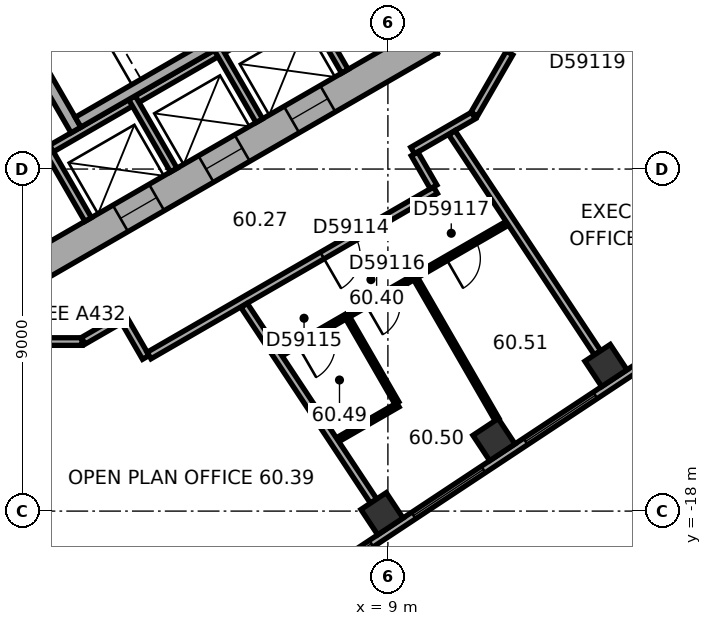
"""IFC4 building model, lengths in metres.
Left out: names, types, materials, properties, quantities, classifications, styles, units other than length and angle.
Written with IfcOpenShell. Run it as: python <this file> out.ifc"""

import sys

from ifc_helpers import new_model, si_unit, direction, frame, frame_2d, origin, origin_2d, place, context, subcontext, project, spatial, rectangle, extrude, element, fill, save


model = new_model("IFC4")
c1 = context("Model", 3, precision=1e-05, world=origin(), true_north=direction((0.0, 1.0)))
c2 = subcontext(c1, "Body", "Model", "MODEL_VIEW")
j1 = project(units=[si_unit("LENGTHUNIT", "METRE"), si_unit("PLANEANGLEUNIT", "RADIAN")], contexts=[c1])
p1 = place(None, origin())
s1 = spatial("IfcSite", under=j1, at=p1, CompositionType="ELEMENT")
p2 = place(p1, origin())
s2 = spatial("IfcBuilding", under=s1, at=p2, CompositionType="ELEMENT")
p3 = place(p2, frame((0.0, 0.0, 243.9)))
s3 = spatial("IfcBuildingStorey", under=s2, at=p3, CompositionType="ELEMENT", Elevation=243.9)
for number, where, z_axis, x_axis in (
    (1, (8.844, -18.07, 0.0), (0.0, 0.0, 1.0), (0.834, 0.552, 0.0)),
    (2, (11.791, -16.12, 0.0), (0.0, 0.0, 1.0), (0.834, 0.552, 0.0)),
    (3, (14.738, -14.169, 0.0), (0.0, 0.0, 1.0), (0.834, 0.552, 0.0)),
):
    element("IfcColumn", number, at=place(p3, frame(where, z_axis=z_axis, x_axis=x_axis)), inside=s3, PredefinedType="COLUMN", context=c2, shape_type="SweptSolid", body=[
        extrude(rectangle(XDim=0.8, YDim=0.8, at=origin_2d()), origin(), (0.0, 0.0, 1.0), 3.7),
    ])
p4 = place(p3, frame((9.9, -5.947, 0.0), z_axis=(0.0, 0.0, 1.0), x_axis=(0.0, 1.0, 0.0)))
e4 = element("IfcWall", 4, at=p4, inside=s3, PredefinedType="SHEAR", context=c2, shape_type="SweptSolid", body=[
    extrude(rectangle(XDim=11.894, YDim=0.8, at=frame_2d((5.947, 0.0))), origin(), (0.0, 0.0, 1.0), 3.7),
])
p5 = place(p4, frame((6.147, 0.0, 0.0)))
e5 = element("IfcOpeningElement", 5, at=p5, cuts=e4, PredefinedType="OPENING", context=c2, shape_type="SweptSolid", body=[
    extrude(rectangle(XDim=1.5, YDim=2.1, at=frame_2d((0.75, 1.05))), frame((0.0, 0.41, 0.0), z_axis=(0.0, -1.0, 0.0), x_axis=(1.0, 0.0, 0.0)), (0.0, 0.0, 1.0), 0.82),
])
p6 = place(p4, frame((1.697, 0.0, 0.0)))
e6 = element("IfcOpeningElement", 6, at=p6, cuts=e4, PredefinedType="OPENING", context=c2, shape_type="SweptSolid", body=[
    extrude(rectangle(XDim=0.9, YDim=2.1, at=frame_2d((0.45, 1.05))), frame((0.0, 0.41, 0.0), z_axis=(0.0, -1.0, 0.0), x_axis=(1.0, 0.0, 0.0)), (0.0, 0.0, 1.0), 0.82),
])
p7 = place(p4, frame((4.297, 0.0, 0.0)))
e7 = element("IfcOpeningElement", 7, at=p7, cuts=e4, PredefinedType="OPENING", context=c2, shape_type="SweptSolid", body=[
    extrude(rectangle(XDim=0.9, YDim=2.1, at=frame_2d((0.45, 1.05))), frame((0.0, 0.41, 0.0), z_axis=(0.0, -1.0, 0.0), x_axis=(1.0, 0.0, 0.0)), (0.0, 0.0, 1.0), 0.82),
])
p8 = place(p3, frame((-10.1, -5.6, 0.0), z_axis=(0.0, 0.0, 1.0), x_axis=(0.866023897231, -0.500002609418, 0.0)))
e8 = element("IfcWall", 8, at=p8, inside=s3, PredefinedType="SHEAR", context=c2, shape_type="SweptSolid", body=[
    extrude(rectangle(XDim=11.894, YDim=0.8, at=frame_2d((5.947, 0.0))), origin(), (0.0, 0.0, 1.0), 3.7),
])
p9 = place(p8, frame((6.147, 0.0, 0.0)))
e9 = element("IfcOpeningElement", 9, at=p9, cuts=e8, PredefinedType="OPENING", context=c2, shape_type="SweptSolid", body=[
    extrude(rectangle(XDim=1.5, YDim=2.1, at=frame_2d((0.75, 1.05))), frame((0.0, 0.41, 0.0), z_axis=(0.0, -1.0, 0.0), x_axis=(1.0, 0.0, 0.0)), (0.0, 0.0, 1.0), 0.82),
])
p10 = place(p8, frame((1.597, 0.0, 0.0)))
e10 = element("IfcOpeningElement", 10, at=p10, cuts=e8, PredefinedType="OPENING", context=c2, shape_type="SweptSolid", body=[
    extrude(rectangle(XDim=1.1, YDim=2.1, at=frame_2d((0.55, 1.05))), frame((0.0, 0.41, 0.0), z_axis=(0.0, -1.0, 0.0), x_axis=(1.0, 0.0, 0.0)), (0.0, 0.0, 1.0), 0.82),
])
p11 = place(p8, frame((4.197, 0.0, 0.0)))
e11 = element("IfcOpeningElement", 11, at=p11, cuts=e8, PredefinedType="OPENING", context=c2, shape_type="SweptSolid", body=[
    extrude(rectangle(XDim=1.1, YDim=2.1, at=frame_2d((0.55, 1.05))), frame((0.0, 0.41, 0.0), z_axis=(0.0, -1.0, 0.0), x_axis=(1.0, 0.0, 0.0)), (0.0, 0.0, 1.0), 0.82),
])
p12 = place(p3, frame((-0.2, -11.547, 0.0), z_axis=(0.0, 0.0, 1.0), x_axis=(0.866023897231, 0.500002609418, 0.0)))
e12 = element("IfcWall", 12, at=p12, inside=s3, PredefinedType="SHEAR", context=c2, shape_type="SweptSolid", body=[
    extrude(rectangle(XDim=11.894, YDim=0.8, at=frame_2d((5.947, 0.0))), origin(), (0.0, 0.0, 1.0), 3.7),
])
p13 = place(p12, frame((2.497, 0.0, 0.0)))
e13 = element("IfcOpeningElement", 13, at=p13, cuts=e12, PredefinedType="OPENING", context=c2, shape_type="SweptSolid", body=[
    extrude(rectangle(XDim=1.1, YDim=2.1, at=frame_2d((0.55, 1.05))), frame((0.0, 0.41, 0.0), z_axis=(0.0, -1.0, 0.0), x_axis=(1.0, 0.0, 0.0)), (0.0, 0.0, 1.0), 0.82),
])
p14 = place(p12, frame((5.097, 0.0, 0.0)))
e14 = element("IfcOpeningElement", 14, at=p14, cuts=e12, PredefinedType="OPENING", context=c2, shape_type="SweptSolid", body=[
    extrude(rectangle(XDim=1.1, YDim=2.1, at=frame_2d((0.55, 1.05))), frame((0.0, 0.41, 0.0), z_axis=(0.0, -1.0, 0.0), x_axis=(1.0, 0.0, 0.0)), (0.0, 0.0, 1.0), 0.82),
])
p15 = place(p12, frame((7.697, 0.0, 0.0)))
e15 = element("IfcOpeningElement", 15, at=p15, cuts=e12, PredefinedType="OPENING", context=c2, shape_type="SweptSolid", body=[
    extrude(rectangle(XDim=1.1, YDim=2.1, at=frame_2d((0.55, 1.05))), frame((0.0, 0.41, 0.0), z_axis=(0.0, -1.0, 0.0), x_axis=(1.0, 0.0, 0.0)), (0.0, 0.0, 1.0), 0.82),
])
p16 = place(p3, frame((2.739, -22.711, 0.0), z_axis=(0.0, 0.0, 1.0), x_axis=(0.833885723098, 0.551937134838, 0.0)))
e16 = element("IfcWall", 16, at=p16, inside=s3, PredefinedType="STANDARD", context=c2, shape_type="SweptSolid", body=[
    extrude(rectangle(XDim=18.841, YDim=0.2, at=frame_2d((9.421, 0.0))), origin(), (0.0, 0.0, 1.0), 3.7),
])
p17 = place(p16, frame((1.252, 0.0, 0.9)))
e17 = element("IfcOpeningElement", 17, at=p17, cuts=e16, PredefinedType="OPENING", context=c2, shape_type="SweptSolid", body=[
    extrude(rectangle(XDim=2.2, YDim=2.0, at=frame_2d((1.1, 1.0))), frame((0.0, 0.11, 0.0), z_axis=(0.0, -1.0, 0.0), x_axis=(1.0, 0.0, 0.0)), (0.0, 0.0, 1.0), 0.22),
])
p18 = place(p16, frame((4.786, 0.0, 0.9)))
e18 = element("IfcOpeningElement", 18, at=p18, cuts=e16, PredefinedType="OPENING", context=c2, shape_type="SweptSolid", body=[
    extrude(rectangle(XDim=2.2, YDim=2.0, at=frame_2d((1.1, 1.0))), frame((0.0, 0.11, 0.0), z_axis=(0.0, -1.0, 0.0), x_axis=(1.0, 0.0, 0.0)), (0.0, 0.0, 1.0), 0.22),
])
p19 = place(p16, frame((8.32, 0.0, 0.9)))
e19 = element("IfcOpeningElement", 19, at=p19, cuts=e16, PredefinedType="OPENING", context=c2, shape_type="SweptSolid", body=[
    extrude(rectangle(XDim=2.2, YDim=2.0, at=frame_2d((1.1, 1.0))), frame((0.0, 0.11, 0.0), z_axis=(0.0, -1.0, 0.0), x_axis=(1.0, 0.0, 0.0)), (0.0, 0.0, 1.0), 0.22),
])
p20 = place(p16, frame((11.854, 0.0, 0.9)))
e20 = element("IfcOpeningElement", 20, at=p20, cuts=e16, PredefinedType="OPENING", context=c2, shape_type="SweptSolid", body=[
    extrude(rectangle(XDim=2.2, YDim=2.0, at=frame_2d((1.1, 1.0))), frame((0.0, 0.11, 0.0), z_axis=(0.0, -1.0, 0.0), x_axis=(1.0, 0.0, 0.0)), (0.0, 0.0, 1.0), 0.22),
])
p21 = place(p16, frame((15.387, 0.0, 0.9)))
e21 = element("IfcOpeningElement", 21, at=p21, cuts=e16, PredefinedType="OPENING", context=c2, shape_type="SweptSolid", body=[
    extrude(rectangle(XDim=2.2, YDim=2.0, at=frame_2d((1.1, 1.0))), frame((0.0, 0.11, 0.0), z_axis=(0.0, -1.0, 0.0), x_axis=(1.0, 0.0, 0.0)), (0.0, 0.0, 1.0), 0.22),
])
p22 = place(p3, frame((-0.024, -8.559, 0.0), z_axis=(0.0, 0.0, 1.0), x_axis=(0.866026010844, 0.49999894854, 0.0)))
e22 = element("IfcWall", 22, at=p22, inside=s3, PredefinedType="PARTITIONING", context=c2, shape_type="SweptSolid", body=[
    extrude(rectangle(XDim=8.0, YDim=0.2, at=frame_2d((4.0, 0.0))), origin(), (0.0, 0.0, 1.0), 3.42),
])
for number, where, z_axis, x_axis in (
    (23, (0.013, -8.422, 0.0), (0.0, 0.0, 1.0), (0.5, -0.866, 0.0)),
    (24, (2.264, -7.122, 0.0), (0.0, 0.0, 1.0), (0.5, -0.866, 0.0)),
    (25, (4.516, -5.822, 0.0), (0.0, 0.0, 1.0), (0.5, -0.866, 0.0)),
    (26, (6.768, -4.522, 0.0), (0.0, 0.0, 1.0), (0.5, -0.866, 0.0)),
):
    element("IfcWall", number, at=place(p3, frame(where, z_axis=z_axis, x_axis=x_axis)), inside=s3, PredefinedType="PARTITIONING", context=c2, shape_type="SweptSolid", body=[
        extrude(rectangle(XDim=2.2, YDim=0.2, at=frame_2d((1.1, 0.0))), origin(), (0.0, 0.0, 1.0), 3.42),
    ])
p23 = place(p3, frame((-1.558, -3.902, 0.0), z_axis=(0.0, 0.0, 1.0), x_axis=(0.499977259774, -0.866038532462, 0.0)))
e27 = element("IfcWall", 27, at=p23, inside=s3, PredefinedType="SHEAR", context=c2, shape_type="SweptSolid", body=[
    extrude(rectangle(XDim=4.7, YDim=0.3, at=frame_2d((2.35, 0.0))), origin(), (0.0, 0.0, 1.0), 3.42),
])
p24 = place(p23, frame((0.8, 0.0, 0.0)))
e28 = element("IfcOpeningElement", 28, at=p24, cuts=e27, PredefinedType="OPENING", context=c2, shape_type="SweptSolid", body=[
    extrude(rectangle(XDim=1.2, YDim=2.1, at=frame_2d((0.6, 1.05))), frame((0.0, 0.16, 0.0), z_axis=(0.0, -1.0, 0.0), x_axis=(1.0, 0.0, 0.0)), (0.0, 0.0, 1.0), 0.32),
])
p25 = place(p3, frame((0.847, -7.767, 0.0), z_axis=(0.0, 0.0, 1.0), x_axis=(0.866027801685, 0.499995846692, 0.0)))
e29 = element("IfcWall", 29, at=p25, inside=s3, PredefinedType="SHEAR", context=c2, shape_type="SweptSolid", body=[
    extrude(rectangle(XDim=7.06, YDim=0.3, at=frame_2d((3.53, 0.0))), origin(), (0.0, 0.0, 1.0), 3.42),
])
p26 = place(p3, frame((-0.91, -13.539, 0.0), z_axis=(0.0, 0.0, 1.0), x_axis=(1.0, 0.0, 0.0)))
e30 = element("IfcWall", 30, at=p26, inside=s3, PredefinedType="PARTITIONING", context=c2, shape_type="SweptSolid", body=[
    extrude(rectangle(XDim=1.86, YDim=0.2, at=frame_2d((0.93, 0.0))), origin(), (0.0, 0.0, 1.0), 3.42),
])
p27 = place(p3, frame((0.985, -13.519, 0.0), z_axis=(0.0, 0.0, 1.0), x_axis=(0.866054082991, 0.499950322867, 0.0)))
e31 = element("IfcWall", 31, at=p27, inside=s3, PredefinedType="PARTITIONING", context=c2, shape_type="SweptSolid", body=[
    extrude(rectangle(XDim=1.206, YDim=0.2, at=frame_2d((0.603, 0.0))), origin(), (0.0, 0.0, 1.0), 3.42),
])
p28 = place(p3, frame((2.079, -13.003, 0.0), z_axis=(0.0, 0.0, 1.0), x_axis=(0.500074377092, -0.865982457891, 0.0)))
e32 = element("IfcWall", 32, at=p28, inside=s3, PredefinedType="PARTITIONING", context=c2, shape_type="SweptSolid", body=[
    extrude(rectangle(XDim=1.101, YDim=0.2, at=frame_2d((0.55, 0.0))), origin(), (0.0, 0.0, 1.0), 3.42),
])
p29 = place(p3, frame((2.716, -13.906, 0.0), z_axis=(0.0, 0.0, 1.0), x_axis=(0.866040290674, 0.499974214264, 0.0)))
e33 = element("IfcWall", 33, at=p29, inside=s3, PredefinedType="PARTITIONING", context=c2, shape_type="SweptSolid", body=[
    extrude(rectangle(XDim=8.702, YDim=0.2, at=frame_2d((4.351, 0.0))), origin(), (0.0, 0.0, 1.0), 3.42),
])
p30 = place(p29, frame((5.26, 0.0, 0.0)))
e34 = element("IfcOpeningElement", 34, at=p30, cuts=e33, PredefinedType="OPENING", context=c2, shape_type="SweptSolid", body=[
    extrude(rectangle(XDim=1.0, YDim=2.1, at=frame_2d((0.5, 1.05))), frame((0.0, 0.11, 0.0), z_axis=(0.0, -1.0, 0.0), x_axis=(1.0, 0.0, 0.0)), (0.0, 0.0, 1.0), 0.22),
])
p31 = place(p3, frame((6.183, -13.867, 0.0), z_axis=(0.0, 0.0, 1.0), x_axis=(0.866031365477, 0.499989673903, 0.0)))
e35 = element("IfcWall", 35, at=p31, inside=s3, PredefinedType="PARTITIONING", context=c2, shape_type="SweptSolid", body=[
    extrude(rectangle(XDim=6.881, YDim=0.12, at=frame_2d((3.44, 0.0))), origin(), (0.0, 0.0, 1.0), 3.42),
])
p32 = place(p31, frame((0.5, 0.0, 0.0)))
e36 = element("IfcOpeningElement", 36, at=p32, cuts=e35, PredefinedType="OPENING", context=c2, shape_type="SweptSolid", body=[
    extrude(rectangle(XDim=1.0, YDim=2.1, at=frame_2d((0.5, 1.05))), frame((0.0, 0.07, 0.0), z_axis=(0.0, -1.0, 0.0), x_axis=(1.0, 0.0, 0.0)), (0.0, 0.0, 1.0), 0.14),
])
p33 = place(p31, frame((2.583, 0.0, 0.0)))
e37 = element("IfcOpeningElement", 37, at=p33, cuts=e35, PredefinedType="OPENING", context=c2, shape_type="SweptSolid", body=[
    extrude(rectangle(XDim=0.9, YDim=2.1, at=frame_2d((0.45, 1.05))), frame((0.0, 0.07, 0.0), z_axis=(0.0, -1.0, 0.0), x_axis=(1.0, 0.0, 0.0)), (0.0, 0.0, 1.0), 0.14),
])
p34 = place(p31, frame((5.023, 0.0, 0.0)))
e38 = element("IfcOpeningElement", 38, at=p34, cuts=e35, PredefinedType="OPENING", context=c2, shape_type="SweptSolid", body=[
    extrude(rectangle(XDim=0.9, YDim=2.1, at=frame_2d((0.45, 1.05))), frame((0.0, 0.07, 0.0), z_axis=(0.0, -1.0, 0.0), x_axis=(1.0, 0.0, 0.0)), (0.0, 0.0, 1.0), 0.14),
])
p35 = place(p3, frame((7.676, -16.123, 0.0), z_axis=(0.0, 0.0, 1.0), x_axis=(0.866023842607, 0.500002704028, 0.0)))
e39 = element("IfcWall", 39, at=p35, inside=s3, PredefinedType="PARTITIONING", context=c2, shape_type="SweptSolid", body=[
    extrude(rectangle(XDim=1.835, YDim=0.12, at=frame_2d((0.917, 0.0))), origin(), (0.0, 0.0, 1.0), 3.42),
])
p36 = place(p3, frame((8.624, -17.737, 0.0), z_axis=(0.0, 0.0, 1.0), x_axis=(-0.55193161762, 0.83388937484, 0.0)))
e40 = element("IfcWall", 40, at=p36, inside=s3, PredefinedType="PARTITIONING", context=c2, shape_type="SweptSolid", body=[
    extrude(rectangle(XDim=6.173, YDim=0.2, at=frame_2d((3.086, 0.0))), origin(), (0.0, 0.0, 1.0), 2.87),
])
p37 = place(p3, frame((9.235, -15.154, 0.0), z_axis=(0.0, 0.0, 1.0), x_axis=(-0.500006411147, 0.866021702275, 0.0)))
e41 = element("IfcWall", 41, at=p37, inside=s3, PredefinedType="PARTITIONING", context=c2, shape_type="SweptSolid", body=[
    extrude(rectangle(XDim=2.58, YDim=0.12, at=frame_2d((1.29, 0.0))), origin(), (0.0, 0.0, 1.0), 3.42),
])
p38 = place(p3, frame((9.652, -8.515, 0.0), z_axis=(0.0, 0.0, 1.0), x_axis=(0.866020375458, 0.500008709215, 0.0)))
e42 = element("IfcWall", 42, at=p38, inside=s3, PredefinedType="PARTITIONING", context=c2, shape_type="SweptSolid", body=[
    extrude(rectangle(XDim=1.846, YDim=0.2, at=frame_2d((0.923, 0.0))), origin(), (0.0, 0.0, 1.0), 3.42),
])
p39 = place(p3, frame((10.202, -9.469, 0.0), z_axis=(0.0, 0.0, 1.0), x_axis=(-0.499968756647, 0.866043441391, 0.0)))
e43 = element("IfcWall", 43, at=p39, inside=s3, PredefinedType="PARTITIONING", context=c2, shape_type="SweptSolid", body=[
    extrude(rectangle(XDim=1.001, YDim=0.2, at=frame_2d((0.5, 0.0))), origin(), (0.0, 0.0, 1.0), 3.42),
])
p40 = place(p3, frame((11.27, -7.558, 0.0), z_axis=(0.0, 0.0, 1.0), x_axis=(0.499964847546, 0.866045698112, 0.0)))
e44 = element("IfcWall", 44, at=p40, inside=s3, PredefinedType="PARTITIONING", context=c2, shape_type="SweptSolid", body=[
    extrude(rectangle(XDim=1.86, YDim=0.2, at=frame_2d((0.93, 0.0))), origin(), (0.0, 0.0, 1.0), 3.42),
])
p41 = place(p3, frame((11.87, -15.588, 0.0), z_axis=(0.0, 0.0, 1.0), x_axis=(-0.49999774064, 0.866026708223, 0.0)))
e45 = element("IfcWall", 45, at=p41, inside=s3, PredefinedType="PARTITIONING", context=c2, shape_type="SweptSolid", body=[
    extrude(rectangle(XDim=4.273, YDim=0.12, at=frame_2d((2.137, 0.0))), origin(), (0.0, 0.0, 1.0), 3.42),
])
p42 = place(p3, frame((14.517, -13.836, 0.0), z_axis=(0.0, 0.0, 1.0), x_axis=(-0.551938455794, 0.833884848775, 0.0)))
e46 = element("IfcWall", 46, at=p42, inside=s3, PredefinedType="PARTITIONING", context=c2, shape_type="SweptSolid", body=[
    extrude(rectangle(XDim=6.944, YDim=0.2, at=frame_2d((3.472, 0.0))), origin(), (0.0, 0.0, 1.0), 2.87),
])
p43 = place(p18, origin())
e47 = element("IfcWindow", 47, at=p43, inside=s3, PartitioningType="SINGLE_PANEL", PredefinedType="WINDOW", context=c2, shape_type="SweptSolid", body=[
    extrude(rectangle(XDim=2.2, YDim=2.0, at=frame_2d((1.1, 1.0))), frame((0.0, 0.03, 0.0), z_axis=(0.0, -1.0, 0.0), x_axis=(1.0, 0.0, 0.0)), (0.0, 0.0, 1.0), 0.06),
])
fill(e18, e47)
p44 = place(p19, origin())
e48 = element("IfcWindow", 48, at=p44, inside=s3, PartitioningType="SINGLE_PANEL", PredefinedType="WINDOW", context=c2, shape_type="SweptSolid", body=[
    extrude(rectangle(XDim=2.2, YDim=2.0, at=frame_2d((1.1, 1.0))), frame((0.0, 0.03, 0.0), z_axis=(0.0, -1.0, 0.0), x_axis=(1.0, 0.0, 0.0)), (0.0, 0.0, 1.0), 0.06),
])
fill(e19, e48)
p45 = place(p20, origin())
e49 = element("IfcWindow", 49, at=p45, inside=s3, PartitioningType="SINGLE_PANEL", PredefinedType="WINDOW", context=c2, shape_type="SweptSolid", body=[
    extrude(rectangle(XDim=2.2, YDim=2.0, at=frame_2d((1.1, 1.0))), frame((0.0, 0.03, 0.0), z_axis=(0.0, -1.0, 0.0), x_axis=(1.0, 0.0, 0.0)), (0.0, 0.0, 1.0), 0.06),
])
fill(e20, e49)
p46 = place(p13, origin())
e50 = element("IfcDoor", 50, at=p46, inside=s3, OperationType="DOUBLE_DOOR_SLIDING", PredefinedType="DOOR", context=c2, shape_type="SweptSolid", body=[
    extrude(rectangle(XDim=1.1, YDim=2.1, at=frame_2d((0.55, 1.05))), frame((0.0, 0.025, 0.0), z_axis=(0.0, -1.0, 0.0), x_axis=(1.0, 0.0, 0.0)), (0.0, 0.0, 1.0), 0.05),
])
fill(e13, e50)
p47 = place(p14, origin())
e51 = element("IfcDoor", 51, at=p47, inside=s3, OperationType="DOUBLE_DOOR_SLIDING", PredefinedType="DOOR", context=c2, shape_type="SweptSolid", body=[
    extrude(rectangle(XDim=1.1, YDim=2.1, at=frame_2d((0.55, 1.05))), frame((0.0, 0.025, 0.0), z_axis=(0.0, -1.0, 0.0), x_axis=(1.0, 0.0, 0.0)), (0.0, 0.0, 1.0), 0.05),
])
fill(e14, e51)
p48 = place(p15, origin())
e52 = element("IfcDoor", 52, at=p48, inside=s3, OperationType="DOUBLE_DOOR_SLIDING", PredefinedType="DOOR", context=c2, shape_type="SweptSolid", body=[
    extrude(rectangle(XDim=1.1, YDim=2.1, at=frame_2d((0.55, 1.05))), frame((0.0, 0.025, 0.0), z_axis=(0.0, -1.0, 0.0), x_axis=(1.0, 0.0, 0.0)), (0.0, 0.0, 1.0), 0.05),
])
fill(e15, e52)
p49 = place(p30, origin())
e53 = element("IfcDoor", 53, at=p49, inside=s3, OperationType="SINGLE_SWING_LEFT", PredefinedType="DOOR", context=c2, shape_type="SweptSolid", body=[
    extrude(rectangle(XDim=1.0, YDim=2.1, at=frame_2d((0.5, 1.05))), frame((0.0, 0.025, 0.0), z_axis=(0.0, -1.0, 0.0), x_axis=(1.0, 0.0, 0.0)), (0.0, 0.0, 1.0), 0.05),
])
fill(e34, e53)
p50 = place(p32, origin())
e54 = element("IfcDoor", 54, at=p50, inside=s3, OperationType="SINGLE_SWING_LEFT", PredefinedType="DOOR", context=c2, shape_type="SweptSolid", body=[
    extrude(rectangle(XDim=1.0, YDim=2.1, at=frame_2d((0.5, 1.05))), frame((0.0, 0.025, 0.0), z_axis=(0.0, -1.0, 0.0), x_axis=(1.0, 0.0, 0.0)), (0.0, 0.0, 1.0), 0.05),
])
fill(e36, e54)
p51 = place(p33, origin())
e55 = element("IfcDoor", 55, at=p51, inside=s3, OperationType="SINGLE_SWING_LEFT", PredefinedType="DOOR", context=c2, shape_type="SweptSolid", body=[
    extrude(rectangle(XDim=0.9, YDim=2.1, at=frame_2d((0.45, 1.05))), frame((0.0, 0.025, 0.0), z_axis=(0.0, -1.0, 0.0), x_axis=(1.0, 0.0, 0.0)), (0.0, 0.0, 1.0), 0.05),
])
fill(e37, e55)
p52 = place(p34, origin())
e56 = element("IfcDoor", 56, at=p52, inside=s3, OperationType="SINGLE_SWING_LEFT", PredefinedType="DOOR", context=c2, shape_type="SweptSolid", body=[
    extrude(rectangle(XDim=0.9, YDim=2.1, at=frame_2d((0.45, 1.05))), frame((0.0, 0.025, 0.0), z_axis=(0.0, -1.0, 0.0), x_axis=(1.0, 0.0, 0.0)), (0.0, 0.0, 1.0), 0.05),
])
fill(e38, e56)
save(model, sys.argv[1])
